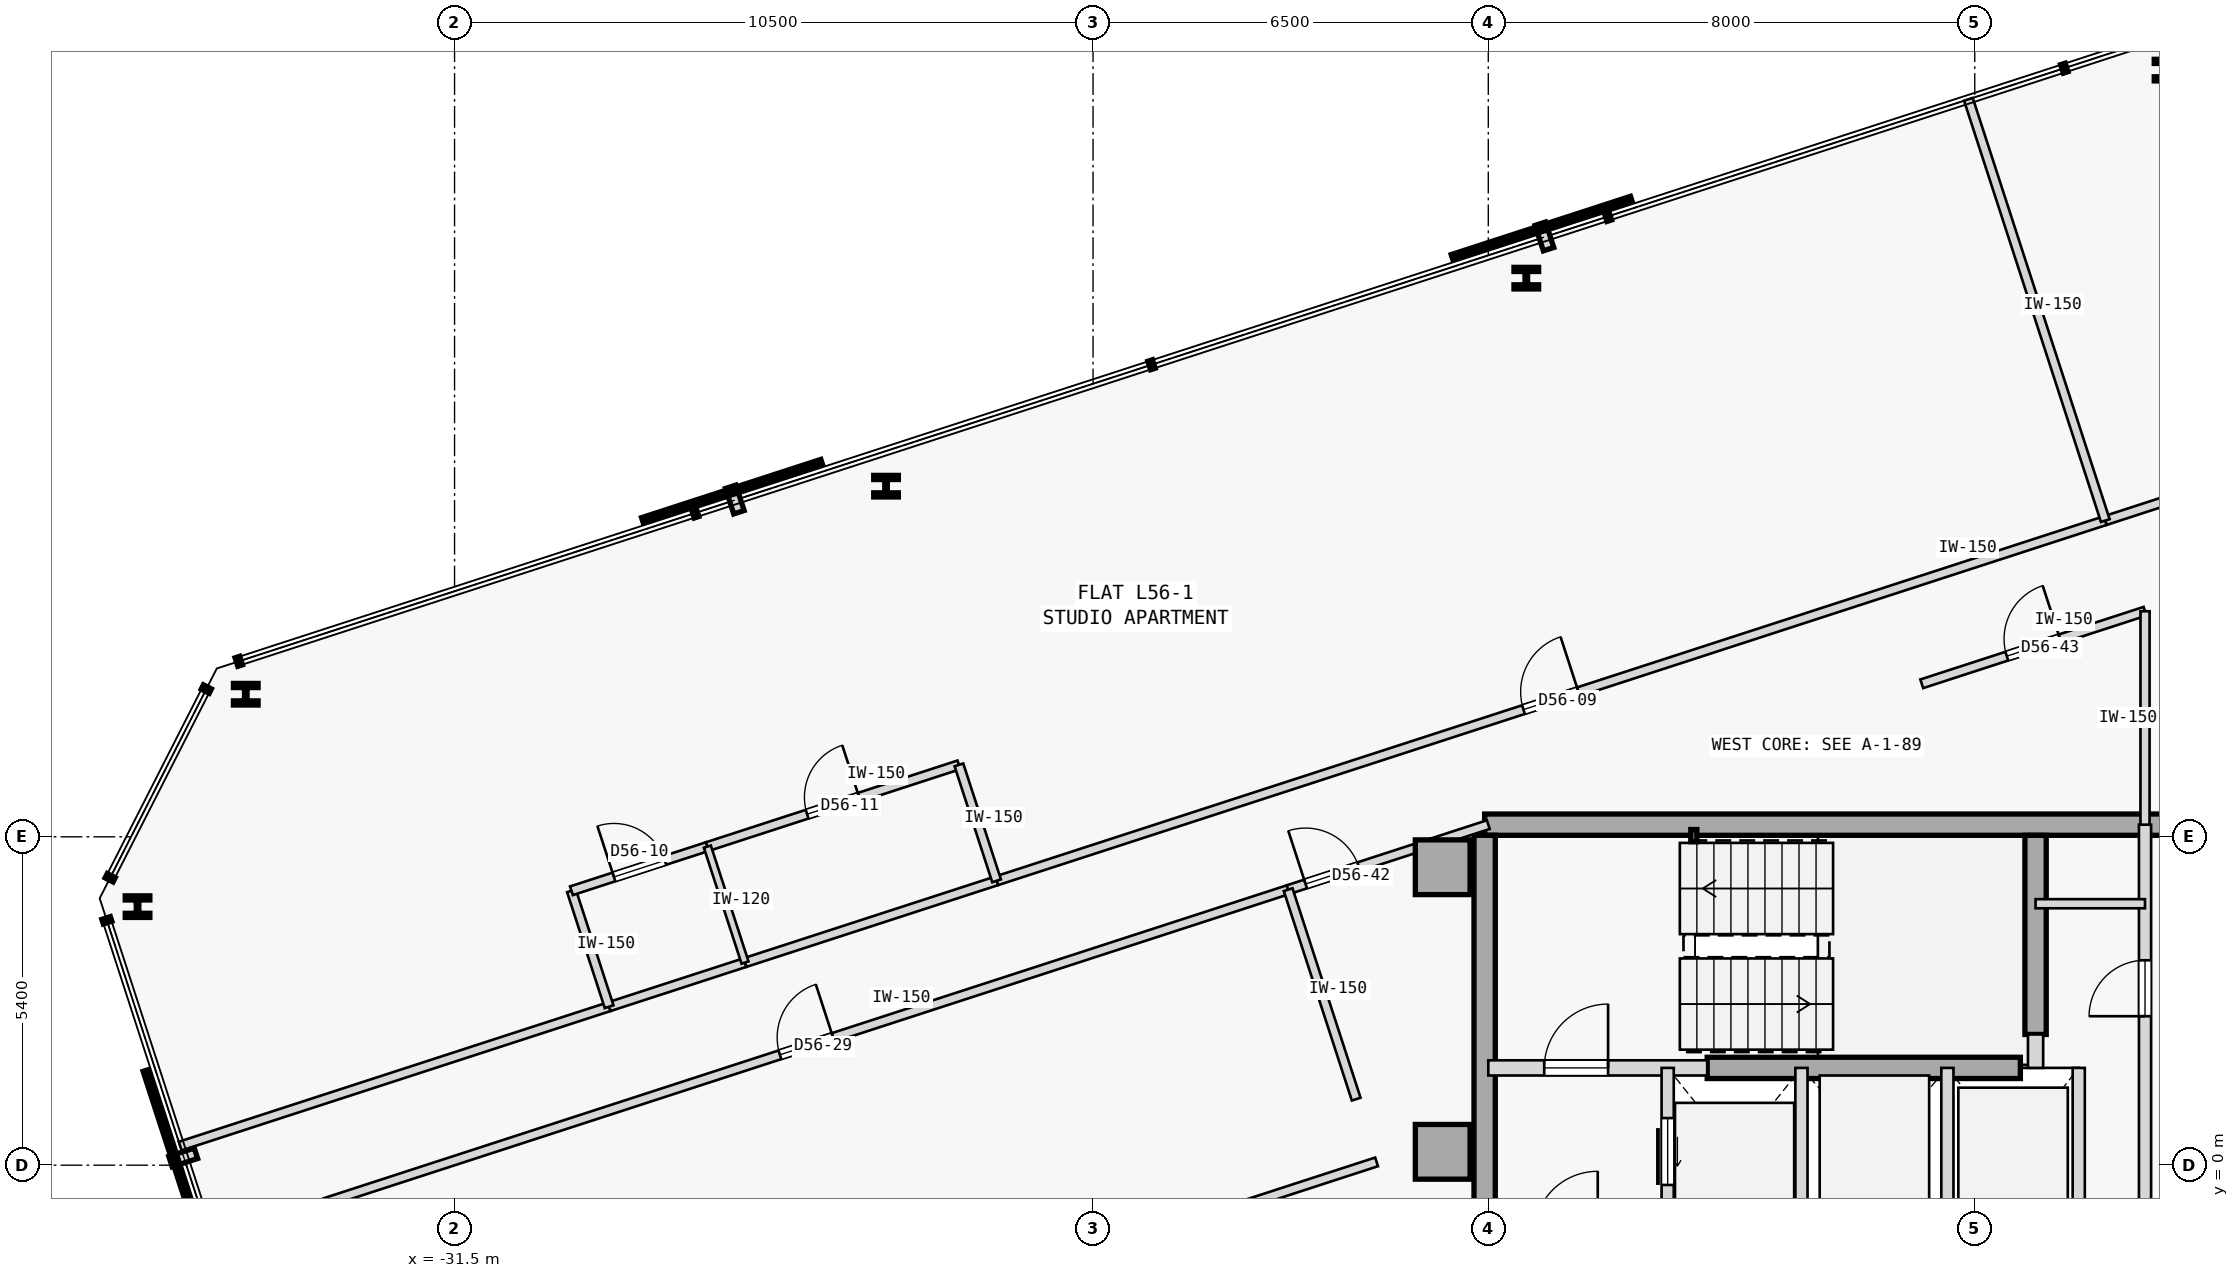
"""IFC4 building model, lengths in metres.
Left out: names, types, materials, properties, quantities, classifications, styles, units other than length and angle.
Written with IfcOpenShell. Run it as: python <this file> out.ifc"""

import sys

from ifc_helpers import new_model, si_unit, direction, frame, frame_2d, origin, origin_2d, place, context, subcontext, project, spatial, rectangle, hollow_rectangle, i_section, extrude, element, fill, save


model = new_model("IFC4")
c1 = context("Model", 3, precision=1e-05, world=origin(), true_north=direction((0.0, 1.0)))
c2 = subcontext(c1, "Body", "Model", "MODEL_VIEW")
j1 = project(units=[si_unit("LENGTHUNIT", "METRE"), si_unit("PLANEANGLEUNIT", "RADIAN")], contexts=[c1])
p1 = place(None, origin())
s1 = spatial("IfcSite", under=j1, at=p1, CompositionType="ELEMENT")
p2 = place(p1, origin())
s2 = spatial("IfcBuilding", under=s1, at=p2, CompositionType="ELEMENT")
p3 = place(p2, frame((0.0, 0.0, 214.25)))
s3 = spatial("IfcBuildingStorey", under=s2, at=p3, CompositionType="ELEMENT", Elevation=214.25)
for number, where, z_axis, x_axis in (
    (1, (-15.25, 4.9, 0.0), (0.0, 0.0, 1.0), (1.0, 0.0, 0.0)),
    (2, (-15.25, 0.22, 0.0), (0.0, 0.0, 1.0), (1.0, 0.0, 0.0)),
):
    element("IfcColumn", number, at=place(p3, frame(where, z_axis=z_axis, x_axis=x_axis)), inside=s3, PredefinedType="COLUMN", context=c2, shape_type="SweptSolid", body=[
        extrude(rectangle(XDim=0.9, YDim=0.9, at=origin_2d()), origin(), (0.0, 0.0, 1.0), 3.35),
    ])
p4 = place(p3, frame((-14.56, 5.6, 0.0), z_axis=(0.0, 0.0, 1.0), x_axis=(1.0, 0.0, 0.0)))
e3 = element("IfcWall", 3, at=p4, inside=s3, PredefinedType="SHEAR", context=c2, shape_type="SweptSolid", body=[
    extrude(rectangle(XDim=11.41, YDim=0.35, at=frame_2d((5.705, 0.0))), origin(), (0.0, 0.0, 1.0), 3.125),
])
p5 = place(p3, frame((-14.56, -5.425, 0.0), z_axis=(0.0, 0.0, 1.0), x_axis=(0.0, 1.0, 0.0)))
e4 = element("IfcWall", 4, at=p5, inside=s3, PredefinedType="SHEAR", context=c2, shape_type="SweptSolid", body=[
    extrude(rectangle(XDim=10.85, YDim=0.35, at=frame_2d((5.425, 0.0))), origin(), (0.0, 0.0, 1.0), 3.125),
])
p6 = place(p3, frame((-5.5, 2.15, 0.0), z_axis=(0.0, 0.0, 1.0), x_axis=(0.0, 1.0, 0.0)))
e5 = element("IfcWall", 5, at=p6, inside=s3, PredefinedType="SHEAR", context=c2, shape_type="SweptSolid", body=[
    extrude(rectangle(XDim=3.275, YDim=0.35, at=frame_2d((1.638, 0.0))), origin(), (0.0, 0.0, 1.0), 3.125),
])
p7 = place(p3, frame((-10.9, 1.6, 0.0), z_axis=(0.0, 0.0, 1.0), x_axis=(1.0, 0.0, 0.0)))
e6 = element("IfcWall", 6, at=p7, inside=s3, PredefinedType="SHEAR", context=c2, shape_type="SweptSolid", body=[
    extrude(rectangle(XDim=5.15, YDim=0.35, at=frame_2d((2.575, 0.0))), origin(), (0.0, 0.0, 1.0), 3.125),
])
p8 = place(p3, frame((-11.12, 5.42, 0.0), z_axis=(0.0, 0.0, 1.0), x_axis=(1.0, 0.0, 0.0)))
e7 = element("IfcColumn", 7, at=p8, inside=s3, PredefinedType="COLUMN", context=c2, shape_type="SweptSolid", body=[
    extrude(hollow_rectangle(XDim=0.1, YDim=0.2, WallThickness=0.008, at=origin_2d()), origin(), (0.0, 0.0, 1.0), 3.35),
])
for number, where, z_axis, x_axis in (
    (8, (-3.346, 18.009, 0.0), (0.0, 0.0, 1.0), (1.0, 0.0, 0.0)),
    (9, (-13.875, 14.587, 0.0), (0.0, 0.0, 1.0), (1.0, 0.0, 0.0)),
    (10, (-24.404, 11.166, 0.0), (0.0, 0.0, 1.0), (1.0, 0.0, 0.0)),
    (11, (-34.934, 7.745, 0.0), (0.0, 0.0, 1.0), (1.0, 0.0, 0.0)),
    (12, (-36.713, 4.252, 0.0), (0.0, 0.0, 1.0), (1.0, 0.0, 0.0)),
):
    element("IfcColumn", number, at=place(p3, frame(where, z_axis=z_axis, x_axis=x_axis)), inside=s3, PredefinedType="COLUMN", context=c2, shape_type="SweptSolid", body=[
        extrude(i_section(OverallWidth=0.405, OverallDepth=0.355, WebThickness=0.042, FlangeThickness=0.068, FilletRadius=0.015, at=origin_2d()), origin(), (0.0, 0.0, 1.0), 3.35),
    ])
p9 = place(p3, frame((-14.5, 1.6, 0.0), z_axis=(0.0, 0.0, 1.0), x_axis=(1.0, 0.0, 0.0)))
e13 = element("IfcWall", 13, at=p9, inside=s3, PredefinedType="STANDARD", context=c2, shape_type="SweptSolid", body=[
    extrude(rectangle(XDim=3.6, YDim=0.25, at=frame_2d((1.8, 0.0))), origin(), (0.0, 0.0, 1.0), 3.125),
])
p10 = place(p9, frame((0.92, 0.0, 0.0)))
e14 = element("IfcOpeningElement", 14, at=p10, cuts=e13, PredefinedType="OPENING", context=c2, shape_type="SweptSolid", body=[
    extrude(rectangle(XDim=1.05, YDim=2.15, at=frame_2d((0.525, 1.075))), frame((0.0, 0.135, 0.0), z_axis=(0.0, -1.0, 0.0), x_axis=(1.0, 0.0, 0.0)), (0.0, 0.0, 1.0), 0.27),
])
p11 = place(p3, frame((-5.5, 1.6, 0.0), z_axis=(0.0, 0.0, 1.0), x_axis=(0.0, 1.0, 0.0)))
e15 = element("IfcWall", 15, at=p11, inside=s3, PredefinedType="STANDARD", context=c2, shape_type="SweptSolid", body=[
    extrude(rectangle(XDim=0.55, YDim=0.25, at=frame_2d((0.275, 0.0))), origin(), (0.0, 0.0, 1.0), 3.125),
])
p12 = place(p3, frame((-3.7, -1.15, 0.0), z_axis=(0.0, 0.0, 1.0), x_axis=(0.0, 1.0, 0.0)))
e16 = element("IfcWall", 16, at=p12, inside=s3, PredefinedType="STANDARD", context=c2, shape_type="SweptSolid", body=[
    extrude(rectangle(XDim=6.75, YDim=0.2, at=frame_2d((3.375, 0.0))), origin(), (0.0, 0.0, 1.0), 3.125),
])
p13 = place(p12, frame((3.6, 0.0, 0.0)))
e17 = element("IfcOpeningElement", 17, at=p13, cuts=e16, PredefinedType="OPENING", context=c2, shape_type="SweptSolid", body=[
    extrude(rectangle(XDim=0.92, YDim=2.15, at=frame_2d((0.46, 1.075))), frame((0.0, 0.11, 0.0), z_axis=(0.0, -1.0, 0.0), x_axis=(1.0, 0.0, 0.0)), (0.0, 0.0, 1.0), 0.22),
])
p14 = place(p3, frame((-11.55, -1.15, 0.0), z_axis=(0.0, 0.0, 1.0), x_axis=(0.0, 1.0, 0.0)))
e18 = element("IfcWall", 18, at=p14, inside=s3, PredefinedType="STANDARD", context=c2, shape_type="SweptSolid", body=[
    extrude(rectangle(XDim=2.75, YDim=0.2, at=frame_2d((1.375, 0.0))), origin(), (0.0, 0.0, 1.0), 3.125),
])
p15 = place(p14, frame((0.825, 0.0, 0.0)))
e19 = element("IfcOpeningElement", 19, at=p15, cuts=e18, PredefinedType="OPENING", context=c2, shape_type="SweptSolid", body=[
    extrude(rectangle(XDim=1.1, YDim=2.15, at=frame_2d((0.55, 1.075))), frame((0.0, 0.11, 0.0), z_axis=(0.0, -1.0, 0.0), x_axis=(1.0, 0.0, 0.0)), (0.0, 0.0, 1.0), 0.22),
])
for number, where, z_axis, x_axis in (
    (20, (-9.35, -1.15, 0.0), (0.0, 0.0, 1.0), (0.0, 1.0, 0.0)),
    (21, (-6.95, -1.15, 0.0), (0.0, 0.0, 1.0), (0.0, 1.0, 0.0)),
    (22, (-4.79, -1.15, 0.0), (0.0, 0.0, 1.0), (0.0, 1.0, 0.0)),
):
    element("IfcWall", number, at=place(p3, frame(where, z_axis=z_axis, x_axis=x_axis)), inside=s3, PredefinedType="STANDARD", context=c2, shape_type="SweptSolid", body=[
        extrude(rectangle(XDim=2.75, YDim=0.2, at=frame_2d((1.375, 0.0))), origin(), (0.0, 0.0, 1.0), 3.125),
    ])
p16 = place(p3, frame((-5.5, 4.3, 0.0), z_axis=(0.0, 0.0, 1.0), x_axis=(1.0, 0.0, 0.0)))
e23 = element("IfcWall", 23, at=p16, inside=s3, PredefinedType="PARTITIONING", context=c2, shape_type="SweptSolid", body=[
    extrude(rectangle(XDim=1.8, YDim=0.15, at=frame_2d((0.9, 0.0))), origin(), (0.0, 0.0, 1.0), 3.125),
])
p17 = place(p3, frame((-36.012, 0.314, 0.0), z_axis=(0.0, 0.0, 1.0), x_axis=(0.951055595173, 0.309019829283, 0.0)))
e24 = element("IfcWall", 24, at=p17, inside=s3, PredefinedType="PARTITIONING", context=c2, shape_type="SweptSolid", body=[
    extrude(rectangle(XDim=7.417, YDim=0.15, at=frame_2d((3.708, 0.0))), origin(), (0.0, 0.0, 1.0), 3.125),
])
p18 = place(p3, frame((-22.586, 4.677, 0.0), z_axis=(0.0, 0.0, 1.0), x_axis=(0.951057743275, 0.309013218095, 0.0)))
e25 = element("IfcWall", 25, at=p18, inside=s3, PredefinedType="PARTITIONING", context=c2, shape_type="SweptSolid", body=[
    extrude(rectangle(XDim=19.171, YDim=0.15, at=frame_2d((9.585, 0.0))), origin(), (0.0, 0.0, 1.0), 3.125),
])
p19 = place(p18, frame((9.111, 0.0, 0.0)))
e26 = element("IfcOpeningElement", 26, at=p19, cuts=e25, PredefinedType="OPENING", context=c2, shape_type="SweptSolid", body=[
    extrude(rectangle(XDim=0.95, YDim=2.15, at=frame_2d((0.475, 1.075))), frame((0.0, 0.085, 0.0), z_axis=(0.0, -1.0, 0.0), x_axis=(1.0, 0.0, 0.0)), (0.0, 0.0, 1.0), 0.17),
])
p20 = place(p3, frame((-28.958, 2.606, 0.0), z_axis=(0.0, 0.0, 1.0), x_axis=(0.951076048914, 0.308956872689, 0.0)))
e27 = element("IfcWall", 27, at=p20, inside=s3, PredefinedType="PARTITIONING", context=c2, shape_type="SweptSolid", body=[
    extrude(rectangle(XDim=2.35, YDim=0.15, at=frame_2d((1.175, 0.0))), origin(), (0.0, 0.0, 1.0), 3.125),
])
p21 = place(p3, frame((-26.723, 3.332, 0.0), z_axis=(0.0, 0.0, 1.0), x_axis=(0.951052627573, 0.309028962374, 0.0)))
e28 = element("IfcWall", 28, at=p21, inside=s3, PredefinedType="PARTITIONING", context=c2, shape_type="SweptSolid", body=[
    extrude(rectangle(XDim=4.35, YDim=0.15, at=frame_2d((2.175, 0.0))), origin(), (0.0, 0.0, 1.0), 3.125),
])
p22 = place(p3, frame((-4.354, 10.601, 0.0), z_axis=(0.0, 0.0, 1.0), x_axis=(0.951050896078, 0.30903429109, 0.0)))
e29 = element("IfcWall", 29, at=p22, inside=s3, PredefinedType="PARTITIONING", context=c2, shape_type="SweptSolid", body=[
    extrude(rectangle(XDim=6.29, YDim=0.15, at=frame_2d((3.145, 0.0))), origin(), (0.0, 0.0, 1.0), 3.125),
])
p23 = place(p3, frame((-33.633, -0.616, 0.0), z_axis=(0.0, 0.0, 1.0), x_axis=(0.951058192995, 0.309011833974, 0.0)))
e30 = element("IfcWall", 30, at=p23, inside=s3, PredefinedType="PARTITIONING", context=c2, shape_type="SweptSolid", body=[
    extrude(rectangle(XDim=16.657, YDim=0.15, at=frame_2d((8.329, 0.0))), origin(), (0.0, 0.0, 1.0), 3.125),
])
p24 = place(p23, frame((7.868, 0.0, 0.0)))
e31 = element("IfcOpeningElement", 31, at=p24, cuts=e30, PredefinedType="OPENING", context=c2, shape_type="SweptSolid", body=[
    extrude(rectangle(XDim=0.92, YDim=2.15, at=frame_2d((0.46, 1.075))), frame((0.0, 0.085, 0.0), z_axis=(0.0, -1.0, 0.0), x_axis=(1.0, 0.0, 0.0)), (0.0, 0.0, 1.0), 0.17),
])
p25 = place(p3, frame((-17.792, 4.531, 0.0), z_axis=(0.0, 0.0, 1.0), x_axis=(0.951047546178, 0.309044600193, 0.0)))
e32 = element("IfcWall", 32, at=p25, inside=s3, PredefinedType="PARTITIONING", context=c2, shape_type="SweptSolid", body=[
    extrude(rectangle(XDim=3.461, YDim=0.15, at=frame_2d((1.73, 0.0))), origin(), (0.0, 0.0, 1.0), 3.125),
])
p26 = place(p25, frame((0.302, 0.0, 0.0)))
e33 = element("IfcOpeningElement", 33, at=p26, cuts=e32, PredefinedType="OPENING", context=c2, shape_type="SweptSolid", body=[
    extrude(rectangle(XDim=0.92, YDim=2.15, at=frame_2d((0.46, 1.075))), frame((0.0, 0.085, 0.0), z_axis=(0.0, -1.0, 0.0), x_axis=(1.0, 0.0, 0.0)), (0.0, 0.0, 1.0), 0.17),
])
p27 = place(p3, frame((-7.372, 7.917, 0.0), z_axis=(0.0, 0.0, 1.0), x_axis=(0.951052654993, 0.309028877989, 0.0)))
e34 = element("IfcWall", 34, at=p27, inside=s3, PredefinedType="PARTITIONING", context=c2, shape_type="SweptSolid", body=[
    extrude(rectangle(XDim=3.861, YDim=0.15, at=frame_2d((1.93, 0.0))), origin(), (0.0, 0.0, 1.0), 3.125),
])
p28 = place(p27, frame((1.47, 0.0, 0.0)))
e35 = element("IfcOpeningElement", 35, at=p28, cuts=e34, PredefinedType="OPENING", context=c2, shape_type="SweptSolid", body=[
    extrude(rectangle(XDim=0.92, YDim=2.15, at=frame_2d((0.46, 1.075))), frame((0.0, 0.085, 0.0), z_axis=(0.0, -1.0, 0.0), x_axis=(1.0, 0.0, 0.0)), (0.0, 0.0, 1.0), 0.17),
])
p29 = place(p3, frame((-3.7, 5.6, 0.0), z_axis=(0.0, 0.0, 1.0), x_axis=(0.000139120755, 0.999999990323, 0.0)))
e36 = element("IfcWall", 36, at=p29, inside=s3, PredefinedType="PARTITIONING", context=c2, shape_type="SweptSolid", body=[
    extrude(rectangle(XDim=3.51, YDim=0.15, at=frame_2d((1.755, 0.0))), origin(), (0.0, 0.0, 1.0), 3.125),
])
p30 = place(p3, frame((-28.958, 2.606, 0.0), z_axis=(0.0, 0.0, 1.0), x_axis=(-0.309058537449, 0.951043017129, 0.0)))
e37 = element("IfcWall", 37, at=p30, inside=s3, PredefinedType="PARTITIONING", context=c2, shape_type="SweptSolid", body=[
    extrude(rectangle(XDim=2.005, YDim=0.15, at=frame_2d((1.002, 0.0))), origin(), (0.0, 0.0, 1.0), 3.125),
])
p31 = place(p3, frame((-29.578, 4.513, 0.0), z_axis=(0.0, 0.0, 1.0), x_axis=(0.951076048914, 0.308956872689, 0.0)))
e38 = element("IfcWall", 38, at=p31, inside=s3, PredefinedType="PARTITIONING", context=c2, shape_type="SweptSolid", body=[
    extrude(rectangle(XDim=2.35, YDim=0.15, at=frame_2d((1.175, 0.0))), origin(), (0.0, 0.0, 1.0), 3.125),
])
p32 = place(p31, frame((0.735, 0.0, 0.0)))
e39 = element("IfcOpeningElement", 39, at=p32, cuts=e38, PredefinedType="OPENING", context=c2, shape_type="SweptSolid", body=[
    extrude(rectangle(XDim=0.88, YDim=2.15, at=frame_2d((0.44, 1.075))), frame((0.0, 0.085, 0.0), z_axis=(0.0, -1.0, 0.0), x_axis=(1.0, 0.0, 0.0)), (0.0, 0.0, 1.0), 0.17),
])
p33 = place(p3, frame((-27.343, 5.239, 0.0), z_axis=(0.0, 0.0, 1.0), x_axis=(0.951036130958, 0.309079726951, 0.0)))
e40 = element("IfcWall", 40, at=p33, inside=s3, PredefinedType="PARTITIONING", context=c2, shape_type="SweptSolid", body=[
    extrude(rectangle(XDim=4.35, YDim=0.15, at=frame_2d((2.175, 0.0))), origin(), (0.0, 0.0, 1.0), 3.125),
])
p34 = place(p33, frame((1.725, 0.0, 0.0)))
e41 = element("IfcOpeningElement", 41, at=p34, cuts=e40, PredefinedType="OPENING", context=c2, shape_type="SweptSolid", body=[
    extrude(rectangle(XDim=0.9, YDim=2.15, at=frame_2d((0.45, 1.075))), frame((0.0, 0.085, 0.0), z_axis=(0.0, -1.0, 0.0), x_axis=(1.0, 0.0, 0.0)), (0.0, 0.0, 1.0), 0.17),
])
p35 = place(p3, frame((-22.586, 4.677, 0.0), z_axis=(0.0, 0.0, 1.0), x_axis=(-0.309022749039, 0.951054646472, 0.0)))
e42 = element("IfcWall", 42, at=p35, inside=s3, PredefinedType="PARTITIONING", context=c2, shape_type="SweptSolid", body=[
    extrude(rectangle(XDim=2.005, YDim=0.15, at=frame_2d((1.002, 0.0))), origin(), (0.0, 0.0, 1.0), 3.125),
])
p36 = place(p3, frame((-4.354, 10.601, 0.0), z_axis=(0.0, 0.0, 1.0), x_axis=(-0.308989064099, 0.951065590939, 0.0)))
e43 = element("IfcWall", 43, at=p36, inside=s3, PredefinedType="PARTITIONING", context=c2, shape_type="SweptSolid", body=[
    extrude(rectangle(XDim=7.284, YDim=0.15, at=frame_2d((3.642, 0.0))), origin(), (0.0, 0.0, 1.0), 3.125),
])
p37 = place(p3, frame((-26.723, 3.332, 0.0), z_axis=(0.0, 0.0, 1.0), x_axis=(-0.309058537449, 0.951043017129, 0.0)))
e44 = element("IfcWall", 44, at=p37, inside=s3, PredefinedType="PARTITIONING", context=c2, shape_type="SweptSolid", body=[
    extrude(rectangle(XDim=2.005, YDim=0.12, at=frame_2d((1.002, 0.0))), origin(), (0.0, 0.0, 1.0), 3.125),
])
p38 = place(p3, frame((-32.179, -5.093, 0.0), z_axis=(0.0, 0.0, 1.0), x_axis=(0.951053885426, 0.309025091239, 0.0)))
e45 = element("IfcWall", 45, at=p38, inside=s3, PredefinedType="PARTITIONING", context=c2, shape_type="SweptSolid", body=[
    extrude(rectangle(XDim=16.657, YDim=0.15, at=frame_2d((8.329, 0.0))), origin(), (0.0, 0.0, 1.0), 3.125),
])
p39 = place(p3, frame((-16.672, 1.086, 0.0), z_axis=(0.0, 0.0, 1.0), x_axis=(-0.308979382511, 0.951068736308, 0.0)))
e46 = element("IfcWall", 46, at=p39, inside=s3, PredefinedType="PARTITIONING", context=c2, shape_type="SweptSolid", body=[
    extrude(rectangle(XDim=3.622, YDim=0.15, at=frame_2d((1.811, 0.0))), origin(), (0.0, 0.0, 1.0), 3.125),
])
p40 = place(p10, origin())
e47 = element("IfcDoor", 47, at=p40, inside=s3, OperationType="SINGLE_SWING_RIGHT", PredefinedType="DOOR", context=c2, shape_type="SweptSolid", body=[
    extrude(rectangle(XDim=1.05, YDim=2.15, at=frame_2d((0.525, 1.075))), frame((0.0, 0.025, 0.0), z_axis=(0.0, -1.0, 0.0), x_axis=(1.0, 0.0, 0.0)), (0.0, 0.0, 1.0), 0.05),
])
fill(e14, e47)
p41 = place(p15, origin())
e48 = element("IfcDoor", 48, at=p41, inside=s3, OperationType="SLIDING_TO_RIGHT", PredefinedType="DOOR", context=c2, shape_type="SweptSolid", body=[
    extrude(rectangle(XDim=1.1, YDim=2.15, at=frame_2d((0.55, 1.075))), frame((0.0, 0.025, 0.0), z_axis=(0.0, -1.0, 0.0), x_axis=(1.0, 0.0, 0.0)), (0.0, 0.0, 1.0), 0.05),
])
fill(e19, e48)
p42 = place(p13, origin())
e49 = element("IfcDoor", 49, at=p42, inside=s3, OperationType="SINGLE_SWING_LEFT", PredefinedType="DOOR", context=c2, shape_type="SweptSolid", body=[
    extrude(rectangle(XDim=0.92, YDim=2.15, at=frame_2d((0.46, 1.075))), frame((0.0, 0.025, 0.0), z_axis=(0.0, -1.0, 0.0), x_axis=(1.0, 0.0, 0.0)), (0.0, 0.0, 1.0), 0.05),
])
fill(e17, e49)
p43 = place(p19, origin())
e50 = element("IfcDoor", 50, at=p43, inside=s3, OperationType="SINGLE_SWING_RIGHT", PredefinedType="DOOR", context=c2, shape_type="SweptSolid", body=[
    extrude(rectangle(XDim=0.95, YDim=2.15, at=frame_2d((0.475, 1.075))), frame((0.0, 0.025, 0.0), z_axis=(0.0, -1.0, 0.0), x_axis=(1.0, 0.0, 0.0)), (0.0, 0.0, 1.0), 0.05),
])
fill(e26, e50)
p44 = place(p32, origin())
e51 = element("IfcDoor", 51, at=p44, inside=s3, OperationType="SINGLE_SWING_LEFT", PredefinedType="DOOR", context=c2, shape_type="SweptSolid", body=[
    extrude(rectangle(XDim=0.88, YDim=2.15, at=frame_2d((0.44, 1.075))), frame((0.0, 0.025, 0.0), z_axis=(0.0, -1.0, 0.0), x_axis=(1.0, 0.0, 0.0)), (0.0, 0.0, 1.0), 0.05),
])
fill(e39, e51)
p45 = place(p34, origin())
e52 = element("IfcDoor", 52, at=p45, inside=s3, OperationType="SINGLE_SWING_RIGHT", PredefinedType="DOOR", context=c2, shape_type="SweptSolid", body=[
    extrude(rectangle(XDim=0.9, YDim=2.15, at=frame_2d((0.45, 1.075))), frame((0.0, 0.025, 0.0), z_axis=(0.0, -1.0, 0.0), x_axis=(1.0, 0.0, 0.0)), (0.0, 0.0, 1.0), 0.05),
])
fill(e41, e52)
p46 = place(p24, origin())
e53 = element("IfcDoor", 53, at=p46, inside=s3, OperationType="SINGLE_SWING_RIGHT", PredefinedType="DOOR", context=c2, shape_type="SweptSolid", body=[
    extrude(rectangle(XDim=0.92, YDim=2.15, at=frame_2d((0.46, 1.075))), frame((0.0, 0.025, 0.0), z_axis=(0.0, -1.0, 0.0), x_axis=(1.0, 0.0, 0.0)), (0.0, 0.0, 1.0), 0.05),
])
fill(e31, e53)
p47 = place(p26, origin())
e54 = element("IfcDoor", 54, at=p47, inside=s3, OperationType="SINGLE_SWING_LEFT", PredefinedType="DOOR", context=c2, shape_type="SweptSolid", body=[
    extrude(rectangle(XDim=0.92, YDim=2.15, at=frame_2d((0.46, 1.075))), frame((0.0, 0.025, 0.0), z_axis=(0.0, -1.0, 0.0), x_axis=(1.0, 0.0, 0.0)), (0.0, 0.0, 1.0), 0.05),
])
fill(e33, e54)
p48 = place(p28, origin())
e55 = element("IfcDoor", 55, at=p48, inside=s3, OperationType="SINGLE_SWING_RIGHT", PredefinedType="DOOR", context=c2, shape_type="SweptSolid", body=[
    extrude(rectangle(XDim=0.92, YDim=2.15, at=frame_2d((0.46, 1.075))), frame((0.0, 0.025, 0.0), z_axis=(0.0, -1.0, 0.0), x_axis=(1.0, 0.0, 0.0)), (0.0, 0.0, 1.0), 0.05),
])
fill(e35, e55)
save(model, sys.argv[1])
